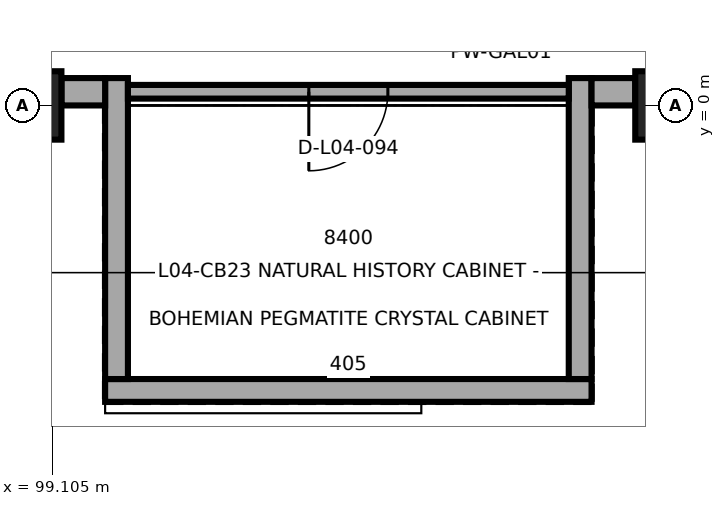
"""IFC4 building model, lengths in metres.
Left out: names, types, materials, properties, quantities, classifications, styles, units other than length and angle.
Written with IfcOpenShell. Run it as: python <this file> out.ifc"""

import sys

from ifc_helpers import new_model, si_unit, direction, frame, frame_2d, origin, origin_2d, place, context, subcontext, project, spatial, rectangle, extrude, element, fill, save


model = new_model("IFC4")
c1 = context("Model", 3, precision=1e-05, world=origin(), true_north=direction((0.0, 1.0)))
c2 = subcontext(c1, "Body", "Model", "MODEL_VIEW")
j1 = project(units=[si_unit("LENGTHUNIT", "METRE"), si_unit("PLANEANGLEUNIT", "RADIAN")], contexts=[c1])
p1 = place(None, origin())
s1 = spatial("IfcSite", under=j1, at=p1, CompositionType="ELEMENT")
p2 = place(p1, origin())
s2 = spatial("IfcBuilding", under=s1, at=p2, CompositionType="ELEMENT")
p3 = place(p2, frame((0.0, 0.0, 21.9)))
s3 = spatial("IfcBuildingStorey", under=s2, at=p3, CompositionType="ELEMENT", Elevation=21.9)
for number, where, z_axis, x_axis in (
    (1, (98.8, 0.0, 0.0), (0.0, 0.0, 1.0), (1.0, 0.0, 0.0)),
    (2, (107.2, 0.0, 0.0), (0.0, 0.0, 1.0), (1.0, 0.0, 0.0)),
):
    element("IfcColumn", number, at=place(p3, frame(where, z_axis=z_axis, x_axis=x_axis)), inside=s3, PredefinedType="COLUMN", context=c2, shape_type="SweptSolid", body=[
        extrude(rectangle(XDim=0.85, YDim=0.9, at=origin_2d()), origin(), (0.0, 0.0, 1.0), 4.5),
    ])
p4 = place(p3, frame((99.8, -3.75, 0.0), z_axis=(0.0, 0.0, 1.0), x_axis=(1.0, 0.0, 0.0)))
e3 = element("IfcWall", 3, at=p4, inside=s3, PredefinedType="SOLIDWALL", context=c2, shape_type="SweptSolid", body=[
    extrude(rectangle(XDim=6.4, YDim=0.3, at=frame_2d((3.2, 0.0))), origin(), (0.0, 0.0, 1.0), 2.99),
])
for number, where, z_axis, x_axis in (
    (4, (99.95, 0.36, 0.0), (0.0, 0.0, 1.0), (0.0, -1.0, 0.0)),
    (5, (106.05, -3.6, 0.0), (0.0, 0.0, 1.0), (0.0, 1.0, 0.0)),
):
    element("IfcWall", number, at=place(p3, frame(where, z_axis=z_axis, x_axis=x_axis)), inside=s3, PredefinedType="SOLIDWALL", context=c2, shape_type="SweptSolid", body=[
        extrude(rectangle(XDim=3.96, YDim=0.3, at=frame_2d((1.98, 0.0))), origin(), (0.0, 0.0, 1.0), 2.99),
    ])
for number, where, z_axis, x_axis in (
    (6, (99.225, 0.18, 0.0), (0.0, 0.0, 1.0), (1.0, 0.0, 0.0)),
    (7, (106.2, 0.18, 0.0), (0.0, 0.0, 1.0), (1.0, 0.0, 0.0)),
):
    element("IfcWall", number, at=place(p3, frame(where, z_axis=z_axis, x_axis=x_axis)), inside=s3, PredefinedType="SOLIDWALL", context=c2, shape_type="SweptSolid", body=[
        extrude(rectangle(XDim=0.575, YDim=0.36, at=frame_2d((0.288, 0.0))), origin(), (0.0, 0.0, 1.0), 3.335),
    ])
p5 = place(p3, frame((100.1, 0.18, 0.0), z_axis=(0.0, 0.0, 1.0), x_axis=(1.0, 0.0, 0.0)))
e8 = element("IfcWall", 8, at=p5, inside=s3, PredefinedType="PARTITIONING", context=c2, shape_type="SweptSolid", body=[
    extrude(rectangle(XDim=5.8, YDim=0.18, at=frame_2d((2.9, 0.0))), origin(), (0.0, 0.0, 1.0), 2.99),
])
p6 = place(p5, frame((2.38, 0.0, 0.0)))
e9 = element("IfcOpeningElement", 9, at=p6, cuts=e8, PredefinedType="OPENING", context=c2, shape_type="SweptSolid", body=[
    extrude(rectangle(XDim=1.04, YDim=2.18, at=frame_2d((0.52, 1.09))), frame((0.0, 0.1, 0.0), z_axis=(0.0, -1.0, 0.0), x_axis=(1.0, 0.0, 0.0)), (0.0, 0.0, 1.0), 0.2),
])
p7 = place(p6, origin())
e10 = element("IfcDoor", 10, at=p7, inside=s3, OperationType="SINGLE_SWING_RIGHT", PredefinedType="DOOR", context=c2, shape_type="SweptSolid", body=[
    extrude(rectangle(XDim=1.04, YDim=2.18, at=frame_2d((0.52, 1.09))), frame((0.0, 0.025, 0.0), z_axis=(0.0, -1.0, 0.0), x_axis=(1.0, 0.0, 0.0)), (0.0, 0.0, 1.0), 0.05),
])
fill(e9, e10)
save(model, sys.argv[1])
